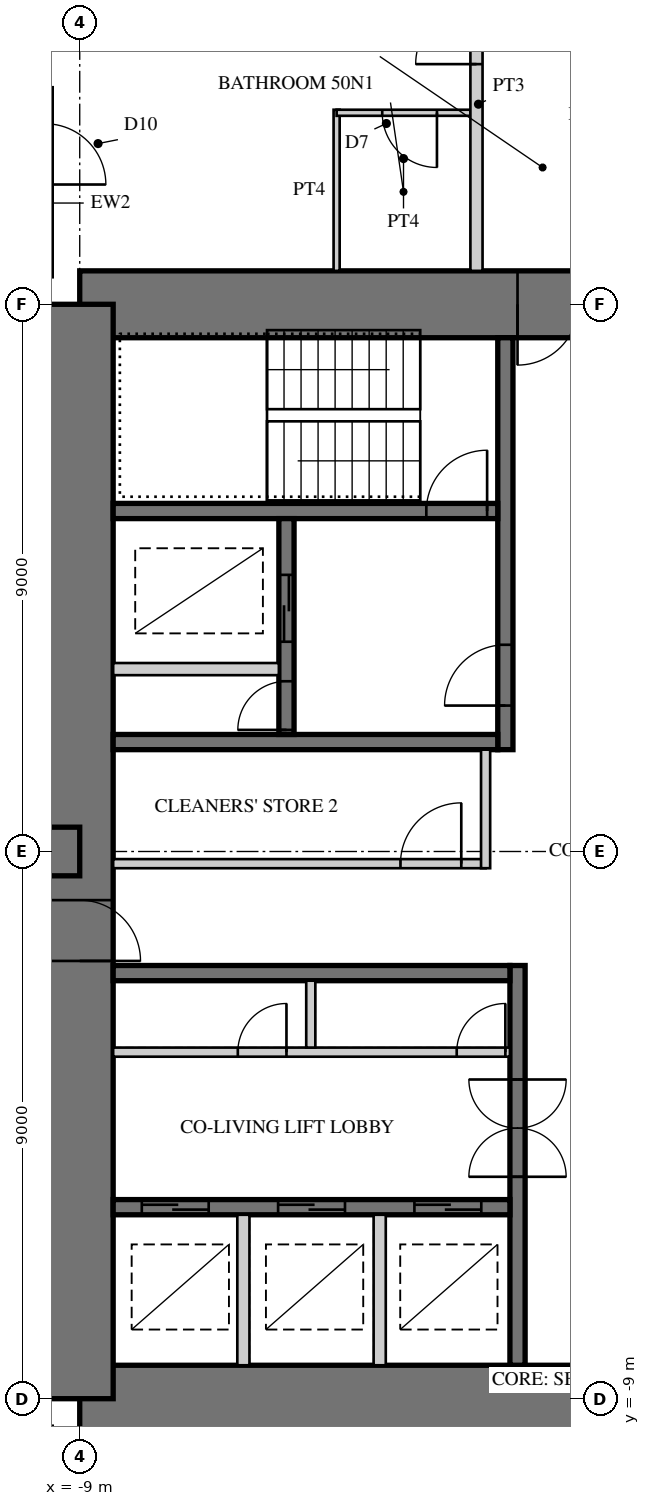
"""IFC4 building model, lengths in metres.
Left out: names, types, materials, properties, quantities, classifications, styles, units other than length and angle.
Written with IfcOpenShell. Run it as: python <this file> out.ifc"""

import sys

from ifc_helpers import new_model, si_unit, direction, frame, frame_2d, origin, place, context, subcontext, project, spatial, rectangle, extrude, element, fill, save


model = new_model("IFC4")
c1 = context("Model", 3, precision=1e-05, world=origin(), true_north=direction((0.0, 1.0)))
c2 = subcontext(c1, "Body", "Model", "MODEL_VIEW")
j1 = project(units=[si_unit("LENGTHUNIT", "METRE"), si_unit("PLANEANGLEUNIT", "RADIAN")], contexts=[c1])
p1 = place(None, origin())
s1 = spatial("IfcSite", under=j1, at=p1, CompositionType="ELEMENT")
p2 = place(p1, origin())
s2 = spatial("IfcBuilding", under=s1, at=p2, CompositionType="ELEMENT")
p3 = place(p2, frame((0.0, 0.0, 200.1)))
s3 = spatial("IfcBuildingStorey", under=s2, at=p3, CompositionType="ELEMENT", Elevation=200.1)
p4 = place(p3, frame((9.0, 9.0, 0.0), z_axis=(0.0, 0.0, 1.0), x_axis=(-1.0, 0.0, 0.0)))
e1 = element("IfcWall", 1, at=p4, inside=s3, PredefinedType="SHEAR", context=c2, shape_type="SweptSolid", body=[
    extrude(rectangle(XDim=18.0, YDim=1.1, at=frame_2d((9.0, 0.0))), origin(), (0.0, 0.0, 1.0), 3.4),
])
p5 = place(p4, frame((9.8, 0.0, 0.0)))
e2 = element("IfcOpeningElement", 2, at=p5, cuts=e1, PredefinedType="OPENING", context=c2, shape_type="SweptSolid", body=[
    extrude(rectangle(XDim=1.0, YDim=2.4, at=frame_2d((0.5, 1.2))), frame((0.0, 0.56, 0.0), z_axis=(0.0, -1.0, 0.0), x_axis=(1.0, 0.0, 0.0)), (0.0, 0.0, 1.0), 1.12),
])
p6 = place(p3, frame((-9.0, -9.0, 0.0), z_axis=(0.0, 0.0, 1.0), x_axis=(1.0, 0.0, 0.0)))
e3 = element("IfcWall", 3, at=p6, inside=s3, PredefinedType="SHEAR", context=c2, shape_type="SweptSolid", body=[
    extrude(rectangle(XDim=18.0, YDim=1.1, at=frame_2d((9.0, 0.0))), origin(), (0.0, 0.0, 1.0), 3.4),
])
p7 = place(p6, frame((9.8, 0.0, 0.0)))
e4 = element("IfcOpeningElement", 4, at=p7, cuts=e3, PredefinedType="OPENING", context=c2, shape_type="SweptSolid", body=[
    extrude(rectangle(XDim=1.0, YDim=2.4, at=frame_2d((0.5, 1.2))), frame((0.0, 0.56, 0.0), z_axis=(0.0, -1.0, 0.0), x_axis=(1.0, 0.0, 0.0)), (0.0, 0.0, 1.0), 1.12),
])
p8 = place(p3, frame((-9.0, 9.0, 0.0), z_axis=(0.0, 0.0, 1.0), x_axis=(0.0, -1.0, 0.0)))
e5 = element("IfcWall", 5, at=p8, inside=s3, PredefinedType="SHEAR", context=c2, shape_type="SweptSolid", body=[
    extrude(rectangle(XDim=18.0, YDim=1.1, at=frame_2d((9.0, 0.0))), origin(), (0.0, 0.0, 1.0), 3.4),
])
p9 = place(p8, frame((9.8, 0.0, 0.0)))
e6 = element("IfcOpeningElement", 6, at=p9, cuts=e5, PredefinedType="OPENING", context=c2, shape_type="SweptSolid", body=[
    extrude(rectangle(XDim=1.0, YDim=2.4, at=frame_2d((0.5, 1.2))), frame((0.0, 0.56, 0.0), z_axis=(0.0, -1.0, 0.0), x_axis=(1.0, 0.0, 0.0)), (0.0, 0.0, 1.0), 1.12),
])
p10 = place(p3, frame((-2.0, 1.675, 0.0), z_axis=(0.0, 0.0, 1.0), x_axis=(0.0, 1.0, 0.0)))
e7 = element("IfcWall", 7, at=p10, inside=s3, PredefinedType="SHEAR", context=c2, shape_type="SweptSolid", body=[
    extrude(rectangle(XDim=6.775, YDim=0.25, at=frame_2d((3.387, 0.0))), origin(), (0.0, 0.0, 1.0), 3.4),
])
p11 = place(p10, frame((0.725, 0.0, 0.0)))
e8 = element("IfcOpeningElement", 8, at=p11, cuts=e7, PredefinedType="OPENING", context=c2, shape_type="SweptSolid", body=[
    extrude(rectangle(XDim=1.0, YDim=2.1, at=frame_2d((0.5, 1.05))), frame((0.0, 0.135, 0.0), z_axis=(0.0, -1.0, 0.0), x_axis=(1.0, 0.0, 0.0)), (0.0, 0.0, 1.0), 0.27),
])
p12 = place(p3, frame((-2.125, 1.8, 0.0), z_axis=(0.0, 0.0, 1.0), x_axis=(-1.0, 0.0, 0.0)))
e9 = element("IfcWall", 9, at=p12, inside=s3, PredefinedType="SHEAR", context=c2, shape_type="SweptSolid", body=[
    extrude(rectangle(XDim=6.325, YDim=0.25, at=frame_2d((3.163, 0.0))), origin(), (0.0, 0.0, 1.0), 3.4),
])
p13 = place(p3, frame((-2.125, 5.6, 0.0), z_axis=(0.0, 0.0, 1.0), x_axis=(-1.0, 0.0, 0.0)))
e10 = element("IfcWall", 10, at=p13, inside=s3, PredefinedType="SHEAR", context=c2, shape_type="SweptSolid", body=[
    extrude(rectangle(XDim=6.325, YDim=0.25, at=frame_2d((3.163, 0.0))), origin(), (0.0, 0.0, 1.0), 3.4),
])
p14 = place(p13, frame((0.175, 0.0, 0.0)))
e11 = element("IfcOpeningElement", 11, at=p14, cuts=e10, PredefinedType="OPENING", context=c2, shape_type="SweptSolid", body=[
    extrude(rectangle(XDim=1.0, YDim=2.1, at=frame_2d((0.5, 1.05))), frame((0.0, 0.135, 0.0), z_axis=(0.0, -1.0, 0.0), x_axis=(1.0, 0.0, 0.0)), (0.0, 0.0, 1.0), 0.27),
])
p15 = place(p3, frame((-5.6, 1.925, 0.0), z_axis=(0.0, 0.0, 1.0), x_axis=(0.0, 1.0, 0.0)))
e12 = element("IfcWall", 12, at=p15, inside=s3, PredefinedType="SHEAR", context=c2, shape_type="SweptSolid", body=[
    extrude(rectangle(XDim=3.55, YDim=0.25, at=frame_2d((1.775, 0.0))), origin(), (0.0, 0.0, 1.0), 3.4),
])
p16 = place(p15, frame((1.525, 0.0, 0.0)))
e13 = element("IfcOpeningElement", 13, at=p16, cuts=e12, PredefinedType="OPENING", context=c2, shape_type="SweptSolid", body=[
    extrude(rectangle(XDim=1.1, YDim=2.2, at=frame_2d((0.55, 1.1))), frame((0.0, 0.135, 0.0), z_axis=(0.0, -1.0, 0.0), x_axis=(1.0, 0.0, 0.0)), (0.0, 0.0, 1.0), 0.27),
])
p17 = place(p15, frame((0.075, 0.0, 0.0)))
e14 = element("IfcOpeningElement", 14, at=p17, cuts=e12, PredefinedType="OPENING", context=c2, shape_type="SweptSolid", body=[
    extrude(rectangle(XDim=0.8, YDim=2.1, at=frame_2d((0.4, 1.05))), frame((0.0, 0.135, 0.0), z_axis=(0.0, -1.0, 0.0), x_axis=(1.0, 0.0, 0.0)), (0.0, 0.0, 1.0), 0.27),
])
p18 = place(p3, frame((-5.725, 3.0, 0.0), z_axis=(0.0, 0.0, 1.0), x_axis=(-1.0, 0.0, 0.0)))
e15 = element("IfcWall", 15, at=p18, inside=s3, PredefinedType="PARTITIONING", context=c2, shape_type="SweptSolid", body=[
    extrude(rectangle(XDim=2.725, YDim=0.2, at=frame_2d((1.362, 0.0))), origin(), (0.0, 0.0, 1.0), 3.4),
])
p19 = place(p3, frame((-1.8, -1.875, 0.0), z_axis=(0.0, 0.0, 1.0), x_axis=(0.0, -1.0, 0.0)))
e16 = element("IfcWall", 16, at=p19, inside=s3, PredefinedType="SHEAR", context=c2, shape_type="SweptSolid", body=[
    extrude(rectangle(XDim=6.575, YDim=0.25, at=frame_2d((3.288, 0.0))), origin(), (0.0, 0.0, 1.0), 3.4),
])
p20 = place(p19, frame((1.875, 0.0, 0.0)))
e17 = element("IfcOpeningElement", 17, at=p20, cuts=e16, PredefinedType="OPENING", context=c2, shape_type="SweptSolid", body=[
    extrude(rectangle(XDim=1.6, YDim=2.4, at=frame_2d((0.8, 1.2))), frame((0.0, 0.135, 0.0), z_axis=(0.0, -1.0, 0.0), x_axis=(1.0, 0.0, 0.0)), (0.0, 0.0, 1.0), 0.27),
])
p21 = place(p3, frame((-1.925, -2.0, 0.0), z_axis=(0.0, 0.0, 1.0), x_axis=(-1.0, 0.0, 0.0)))
e18 = element("IfcWall", 18, at=p21, inside=s3, PredefinedType="SHEAR", context=c2, shape_type="SweptSolid", body=[
    extrude(rectangle(XDim=6.525, YDim=0.25, at=frame_2d((3.262, 0.0))), origin(), (0.0, 0.0, 1.0), 3.4),
])
p22 = place(p3, frame((-1.925, -5.85, 0.0), z_axis=(0.0, 0.0, 1.0), x_axis=(-1.0, 0.0, 0.0)))
e19 = element("IfcWall", 19, at=p22, inside=s3, PredefinedType="SHEAR", context=c2, shape_type="SweptSolid", body=[
    extrude(rectangle(XDim=6.525, YDim=0.25, at=frame_2d((3.262, 0.0))), origin(), (0.0, 0.0, 1.0), 3.4),
])
p23 = place(p22, frame((0.471, 0.0, 0.0)))
e20 = element("IfcOpeningElement", 20, at=p23, cuts=e19, PredefinedType="OPENING", context=c2, shape_type="SweptSolid", body=[
    extrude(rectangle(XDim=1.1, YDim=2.2, at=frame_2d((0.55, 1.1))), frame((0.0, 0.135, 0.0), z_axis=(0.0, -1.0, 0.0), x_axis=(1.0, 0.0, 0.0)), (0.0, 0.0, 1.0), 0.27),
])
p24 = place(p22, frame((2.712, 0.0, 0.0)))
e21 = element("IfcOpeningElement", 21, at=p24, cuts=e19, PredefinedType="OPENING", context=c2, shape_type="SweptSolid", body=[
    extrude(rectangle(XDim=1.1, YDim=2.2, at=frame_2d((0.55, 1.1))), frame((0.0, 0.135, 0.0), z_axis=(0.0, -1.0, 0.0), x_axis=(1.0, 0.0, 0.0)), (0.0, 0.0, 1.0), 0.27),
])
p25 = place(p22, frame((4.954, 0.0, 0.0)))
e22 = element("IfcOpeningElement", 22, at=p25, cuts=e19, PredefinedType="OPENING", context=c2, shape_type="SweptSolid", body=[
    extrude(rectangle(XDim=1.1, YDim=2.2, at=frame_2d((0.55, 1.1))), frame((0.0, 0.135, 0.0), z_axis=(0.0, -1.0, 0.0), x_axis=(1.0, 0.0, 0.0)), (0.0, 0.0, 1.0), 0.27),
])
p26 = place(p3, frame((-1.925, -3.3, 0.0), z_axis=(0.0, 0.0, 1.0), x_axis=(-1.0, 0.0, 0.0)))
e23 = element("IfcWall", 23, at=p26, inside=s3, PredefinedType="PARTITIONING", context=c2, shape_type="SweptSolid", body=[
    extrude(rectangle(XDim=6.525, YDim=0.15, at=frame_2d((3.262, 0.0))), origin(), (0.0, 0.0, 1.0), 3.4),
])
p27 = place(p26, frame((0.075, 0.0, 0.0)))
e24 = element("IfcOpeningElement", 24, at=p27, cuts=e23, PredefinedType="OPENING", context=c2, shape_type="SweptSolid", body=[
    extrude(rectangle(XDim=0.8, YDim=2.1, at=frame_2d((0.4, 1.05))), frame((0.0, 0.085, 0.0), z_axis=(0.0, -1.0, 0.0), x_axis=(1.0, 0.0, 0.0)), (0.0, 0.0, 1.0), 0.17),
])
p28 = place(p26, frame((3.675, 0.0, 0.0)))
e25 = element("IfcOpeningElement", 25, at=p28, cuts=e23, PredefinedType="OPENING", context=c2, shape_type="SweptSolid", body=[
    extrude(rectangle(XDim=0.8, YDim=2.1, at=frame_2d((0.4, 1.05))), frame((0.0, 0.085, 0.0), z_axis=(0.0, -1.0, 0.0), x_axis=(1.0, 0.0, 0.0)), (0.0, 0.0, 1.0), 0.17),
])
p29 = place(p3, frame((-5.2, -2.125, 0.0), z_axis=(0.0, 0.0, 1.0), x_axis=(0.0, -1.0, 0.0)))
e26 = element("IfcWall", 26, at=p29, inside=s3, PredefinedType="PARTITIONING", context=c2, shape_type="SweptSolid", body=[
    extrude(rectangle(XDim=1.1, YDim=0.15, at=frame_2d((0.55, 0.0))), origin(), (0.0, 0.0, 1.0), 3.4),
])
for number, where, z_axis, x_axis in (
    (27, (-4.067, -5.975, 0.0), (0.0, 0.0, 1.0), (0.0, -1.0, 0.0)),
    (28, (-6.308, -5.975, 0.0), (0.0, 0.0, 1.0), (0.0, -1.0, 0.0)),
):
    element("IfcWall", number, at=place(p3, frame(where, z_axis=z_axis, x_axis=x_axis)), inside=s3, PredefinedType="PARTITIONING", context=c2, shape_type="SweptSolid", body=[
        extrude(rectangle(XDim=2.475, YDim=0.2, at=frame_2d((1.237, 0.0))), origin(), (0.0, 0.0, 1.0), 3.4),
    ])
p30 = place(p3, frame((-9.0, 0.0, 0.0), z_axis=(0.0, 0.0, 1.0), x_axis=(-1.0, 0.0, 0.0)))
e29 = element("IfcWall", 29, at=p30, inside=s3, PredefinedType="SHEAR", context=c2, shape_type="SweptSolid", body=[
    extrude(rectangle(XDim=18.0, YDim=0.8, at=frame_2d((9.0, 0.0))), origin(), (0.0, 0.0, 1.0), 3.4),
])
p31 = place(p30, frame((3.95, 0.0, 0.0)))
e30 = element("IfcOpeningElement", 30, at=p31, cuts=e29, PredefinedType="OPENING", context=c2, shape_type="SweptSolid", body=[
    extrude(rectangle(XDim=1.0, YDim=2.15, at=frame_2d((0.5, 1.075))), frame((0.0, 0.41, 0.0), z_axis=(0.0, -1.0, 0.0), x_axis=(1.0, 0.0, 0.0)), (0.0, 0.0, 1.0), 0.82),
])
p32 = place(p30, frame((6.6, 0.0, 0.0)))
e31 = element("IfcOpeningElement", 31, at=p32, cuts=e29, PredefinedType="OPENING", context=c2, shape_type="SweptSolid", body=[
    extrude(rectangle(XDim=1.0, YDim=2.15, at=frame_2d((0.5, 1.075))), frame((0.0, 0.41, 0.0), z_axis=(0.0, -1.0, 0.0), x_axis=(1.0, 0.0, 0.0)), (0.0, 0.0, 1.0), 0.82),
])
p33 = place(p30, frame((13.25, 0.0, 0.0)))
e32 = element("IfcOpeningElement", 32, at=p33, cuts=e29, PredefinedType="OPENING", context=c2, shape_type="SweptSolid", body=[
    extrude(rectangle(XDim=1.0, YDim=2.2, at=frame_2d((0.5, 1.1))), frame((0.0, 0.41, 0.0), z_axis=(0.0, -1.0, 0.0), x_axis=(1.0, 0.0, 0.0)), (0.0, 0.0, 1.0), 0.82),
])
p34 = place(p3, frame((-9.57, 12.57, 0.0), z_axis=(0.0, 0.0, 1.0), x_axis=(0.0, -1.0, 0.0)))
e33 = element("IfcWall", 33, at=p34, inside=s3, PredefinedType="SOLIDWALL", context=c2, shape_type="SweptSolid", body=[
    extrude(rectangle(XDim=2.875, YDim=0.25, at=frame_2d((1.438, 0.0))), origin(), (0.0, 0.0, 1.0), 3.22),
])
p35 = place(p34, frame((0.6, 0.0, 0.0)))
e34 = element("IfcOpeningElement", 34, at=p35, cuts=e33, PredefinedType="OPENING", context=c2, shape_type="SweptSolid", body=[
    extrude(rectangle(XDim=1.0, YDim=2.2, at=frame_2d((0.5, 1.1))), frame((0.0, 0.135, 0.0), z_axis=(0.0, -1.0, 0.0), x_axis=(1.0, 0.0, 0.0)), (0.0, 0.0, 1.0), 0.27),
])
p36 = place(p3, frame((-9.445, 9.57, 0.0), z_axis=(0.0, 0.0, 1.0), x_axis=(-1.0, 0.0, 0.0)))
e35 = element("IfcWall", 35, at=p36, inside=s3, PredefinedType="SOLIDWALL", context=c2, shape_type="SweptSolid", body=[
    extrude(rectangle(XDim=3.125, YDim=0.25, at=frame_2d((1.562, 0.0))), origin(), (0.0, 0.0, 1.0), 3.22),
])
p37 = place(p36, frame((0.6, 0.0, 0.0)))
e36 = element("IfcOpeningElement", 36, at=p37, cuts=e35, PredefinedType="OPENING", context=c2, shape_type="SweptSolid", body=[
    extrude(rectangle(XDim=1.0, YDim=2.2, at=frame_2d((0.5, 1.1))), frame((0.0, 0.135, 0.0), z_axis=(0.0, -1.0, 0.0), x_axis=(1.0, 0.0, 0.0)), (0.0, 0.0, 1.0), 0.27),
])
p38 = place(p3, frame((-9.57, -9.445, 0.0), z_axis=(0.0, 0.0, 1.0), x_axis=(0.0, -1.0, 0.0)))
e37 = element("IfcWall", 37, at=p38, inside=s3, PredefinedType="SOLIDWALL", context=c2, shape_type="SweptSolid", body=[
    extrude(rectangle(XDim=3.125, YDim=0.25, at=frame_2d((1.562, 0.0))), origin(), (0.0, 0.0, 1.0), 3.22),
])
p39 = place(p38, frame((0.6, 0.0, 0.0)))
e38 = element("IfcOpeningElement", 38, at=p39, cuts=e37, PredefinedType="OPENING", context=c2, shape_type="SweptSolid", body=[
    extrude(rectangle(XDim=1.0, YDim=2.2, at=frame_2d((0.5, 1.1))), frame((0.0, 0.135, 0.0), z_axis=(0.0, -1.0, 0.0), x_axis=(1.0, 0.0, 0.0)), (0.0, 0.0, 1.0), 0.27),
])
p40 = place(p3, frame((-2.325, -0.2, 0.0), z_axis=(0.0, 0.0, 1.0), x_axis=(-1.0, 0.0, 0.0)))
e39 = element("IfcWall", 39, at=p40, inside=s3, PredefinedType="PARTITIONING", context=c2, shape_type="SweptSolid", body=[
    extrude(rectangle(XDim=6.125, YDim=0.15, at=frame_2d((3.062, 0.0))), origin(), (0.0, 0.0, 1.0), 3.22),
])
p41 = place(p40, frame((0.4, 0.0, 0.0)))
e40 = element("IfcOpeningElement", 40, at=p41, cuts=e39, PredefinedType="OPENING", context=c2, shape_type="SweptSolid", body=[
    extrude(rectangle(XDim=1.0, YDim=2.1, at=frame_2d((0.5, 1.05))), frame((0.0, 0.085, 0.0), z_axis=(0.0, -1.0, 0.0), x_axis=(1.0, 0.0, 0.0)), (0.0, 0.0, 1.0), 0.17),
])
p42 = place(p3, frame((-2.325, 1.675, 0.0), z_axis=(0.0, 0.0, 1.0), x_axis=(0.0, -1.0, 0.0)))
e41 = element("IfcWall", 41, at=p42, inside=s3, PredefinedType="PARTITIONING", context=c2, shape_type="SweptSolid", body=[
    extrude(rectangle(XDim=1.95, YDim=0.15, at=frame_2d((0.975, 0.0))), origin(), (0.0, 0.0, 1.0), 3.22),
])
p43 = place(p3, frame((-4.775, 9.55, 0.0), z_axis=(0.0, 0.0, 1.0), x_axis=(0.0, 1.0, 0.0)))
e42 = element("IfcWall", 42, at=p43, inside=s3, PredefinedType="PARTITIONING", context=c2, shape_type="SweptSolid", body=[
    extrude(rectangle(XDim=2.65, YDim=0.1, at=frame_2d((1.325, 0.0))), origin(), (0.0, 0.0, 1.0), 3.22),
])
p44 = place(p3, frame((-2.575, 12.15, 0.0), z_axis=(0.0, 0.0, 1.0), x_axis=(-1.0, 0.0, 0.0)))
e43 = element("IfcWall", 43, at=p44, inside=s3, PredefinedType="PARTITIONING", context=c2, shape_type="SweptSolid", body=[
    extrude(rectangle(XDim=2.2, YDim=0.1, at=frame_2d((1.1, 0.0))), origin(), (0.0, 0.0, 1.0), 3.22),
])
p45 = place(p44, frame((0.55, 0.0, 0.0)))
e44 = element("IfcOpeningElement", 44, at=p45, cuts=e43, PredefinedType="OPENING", context=c2, shape_type="SweptSolid", body=[
    extrude(rectangle(XDim=0.9, YDim=2.1, at=frame_2d((0.45, 1.05))), frame((0.0, 0.06, 0.0), z_axis=(0.0, -1.0, 0.0), x_axis=(1.0, 0.0, 0.0)), (0.0, 0.0, 1.0), 0.12),
])
p46 = place(p3, frame((-2.475, 9.55, 0.0), z_axis=(0.0, 0.0, 1.0), x_axis=(0.0, 1.0, 0.0)))
e45 = element("IfcWall", 45, at=p46, inside=s3, PredefinedType="SOLIDWALL", context=c2, shape_type="SweptSolid", body=[
    extrude(rectangle(XDim=5.45, YDim=0.2, at=frame_2d((2.725, 0.0))), origin(), (0.0, 0.0, 1.0), 3.22),
])
p47 = place(p46, frame((3.4, 0.0, 0.0)))
e46 = element("IfcOpeningElement", 46, at=p47, cuts=e45, PredefinedType="OPENING", context=c2, shape_type="SweptSolid", body=[
    extrude(rectangle(XDim=1.0, YDim=2.15, at=frame_2d((0.5, 1.075))), frame((0.0, 0.11, 0.0), z_axis=(0.0, -1.0, 0.0), x_axis=(1.0, 0.0, 0.0)), (0.0, 0.0, 1.0), 0.22),
])
p48 = place(p41, frame((1.0, 0.0, 0.0), z_axis=(0.0, 0.0, 1.0), x_axis=(-1.0, 0.0, 0.0)))
e47 = element("IfcDoor", 47, at=p48, inside=s3, OperationType="SINGLE_SWING_RIGHT", PredefinedType="DOOR", context=c2, shape_type="SweptSolid", body=[
    extrude(rectangle(XDim=1.0, YDim=2.1, at=frame_2d((0.5, 1.05))), frame((0.0, 0.025, 0.0), z_axis=(0.0, -1.0, 0.0), x_axis=(1.0, 0.0, 0.0)), (0.0, 0.0, 1.0), 0.05),
])
fill(e40, e47)
p49 = place(p45, origin())
e48 = element("IfcDoor", 48, at=p49, inside=s3, OperationType="SINGLE_SWING_LEFT", PredefinedType="DOOR", context=c2, shape_type="SweptSolid", body=[
    extrude(rectangle(XDim=0.9, YDim=2.1, at=frame_2d((0.45, 1.05))), frame((0.0, 0.025, 0.0), z_axis=(0.0, -1.0, 0.0), x_axis=(1.0, 0.0, 0.0)), (0.0, 0.0, 1.0), 0.05),
])
fill(e44, e48)
p50 = place(p47, origin())
e49 = element("IfcDoor", 49, at=p50, inside=s3, OperationType="SINGLE_SWING_LEFT", PredefinedType="DOOR", context=c2, shape_type="SweptSolid", body=[
    extrude(rectangle(XDim=1.0, YDim=2.15, at=frame_2d((0.5, 1.075))), frame((0.0, 0.025, 0.0), z_axis=(0.0, -1.0, 0.0), x_axis=(1.0, 0.0, 0.0)), (0.0, 0.0, 1.0), 0.05),
])
fill(e46, e49)
p51 = place(p5, origin())
e50 = element("IfcDoor", 50, at=p51, inside=s3, OperationType="SINGLE_SWING_RIGHT", PredefinedType="DOOR", context=c2, shape_type="SweptSolid", body=[
    extrude(rectangle(XDim=1.0, YDim=2.4, at=frame_2d((0.5, 1.2))), frame((0.0, 0.055, 0.0), z_axis=(0.0, -1.0, 0.0), x_axis=(1.0, 0.0, 0.0)), (0.0, 0.0, 1.0), 0.05),
])
fill(e2, e50)
p52 = place(p9, origin())
e51 = element("IfcDoor", 51, at=p52, inside=s3, OperationType="SINGLE_SWING_RIGHT", PredefinedType="DOOR", context=c2, shape_type="SweptSolid", body=[
    extrude(rectangle(XDim=1.0, YDim=2.4, at=frame_2d((0.5, 1.2))), frame((0.0, 0.055, 0.0), z_axis=(0.0, -1.0, 0.0), x_axis=(1.0, 0.0, 0.0)), (0.0, 0.0, 1.0), 0.05),
])
fill(e6, e51)
p53 = place(p11, origin())
e52 = element("IfcDoor", 52, at=p53, inside=s3, OperationType="SINGLE_SWING_LEFT", PredefinedType="DOOR", context=c2, shape_type="SweptSolid", body=[
    extrude(rectangle(XDim=1.0, YDim=2.1, at=frame_2d((0.5, 1.05))), frame((0.0, 0.025, 0.0), z_axis=(0.0, -1.0, 0.0), x_axis=(1.0, 0.0, 0.0)), (0.0, 0.0, 1.0), 0.05),
])
fill(e8, e52)
p54 = place(p14, frame((1.0, 0.0, 0.0), z_axis=(0.0, 0.0, 1.0), x_axis=(-1.0, 0.0, 0.0)))
e53 = element("IfcDoor", 53, at=p54, inside=s3, OperationType="SINGLE_SWING_RIGHT", PredefinedType="DOOR", context=c2, shape_type="SweptSolid", body=[
    extrude(rectangle(XDim=1.0, YDim=2.1, at=frame_2d((0.5, 1.05))), frame((0.0, 0.025, 0.0), z_axis=(0.0, -1.0, 0.0), x_axis=(1.0, 0.0, 0.0)), (0.0, 0.0, 1.0), 0.05),
])
fill(e11, e53)
p55 = place(p16, origin())
e54 = element("IfcDoor", 54, at=p55, inside=s3, OperationType="DOUBLE_DOOR_SLIDING", PredefinedType="DOOR", context=c2, shape_type="SweptSolid", body=[
    extrude(rectangle(XDim=1.1, YDim=2.2, at=frame_2d((0.55, 1.1))), frame((0.0, 0.025, 0.0), z_axis=(0.0, -1.0, 0.0), x_axis=(1.0, 0.0, 0.0)), (0.0, 0.0, 1.0), 0.05),
])
fill(e13, e54)
p56 = place(p17, origin())
e55 = element("IfcDoor", 55, at=p56, inside=s3, OperationType="SINGLE_SWING_LEFT", PredefinedType="DOOR", context=c2, shape_type="SweptSolid", body=[
    extrude(rectangle(XDim=0.8, YDim=2.1, at=frame_2d((0.4, 1.05))), frame((0.0, 0.025, 0.0), z_axis=(0.0, -1.0, 0.0), x_axis=(1.0, 0.0, 0.0)), (0.0, 0.0, 1.0), 0.05),
])
fill(e14, e55)
p57 = place(p23, origin())
e56 = element("IfcDoor", 56, at=p57, inside=s3, OperationType="DOUBLE_DOOR_SLIDING", PredefinedType="DOOR", context=c2, shape_type="SweptSolid", body=[
    extrude(rectangle(XDim=1.1, YDim=2.2, at=frame_2d((0.55, 1.1))), frame((0.0, 0.025, 0.0), z_axis=(0.0, -1.0, 0.0), x_axis=(1.0, 0.0, 0.0)), (0.0, 0.0, 1.0), 0.05),
])
fill(e20, e56)
p58 = place(p24, origin())
e57 = element("IfcDoor", 57, at=p58, inside=s3, OperationType="DOUBLE_DOOR_SLIDING", PredefinedType="DOOR", context=c2, shape_type="SweptSolid", body=[
    extrude(rectangle(XDim=1.1, YDim=2.2, at=frame_2d((0.55, 1.1))), frame((0.0, 0.025, 0.0), z_axis=(0.0, -1.0, 0.0), x_axis=(1.0, 0.0, 0.0)), (0.0, 0.0, 1.0), 0.05),
])
fill(e21, e57)
p59 = place(p25, origin())
e58 = element("IfcDoor", 58, at=p59, inside=s3, OperationType="DOUBLE_DOOR_SLIDING", PredefinedType="DOOR", context=c2, shape_type="SweptSolid", body=[
    extrude(rectangle(XDim=1.1, YDim=2.2, at=frame_2d((0.55, 1.1))), frame((0.0, 0.025, 0.0), z_axis=(0.0, -1.0, 0.0), x_axis=(1.0, 0.0, 0.0)), (0.0, 0.0, 1.0), 0.05),
])
fill(e22, e58)
p60 = place(p20, origin())
e59 = element("IfcDoor", 59, at=p60, inside=s3, OperationType="DOUBLE_DOOR_DOUBLE_SWING", PredefinedType="DOOR", context=c2, shape_type="SweptSolid", body=[
    extrude(rectangle(XDim=1.6, YDim=2.4, at=frame_2d((0.8, 1.2))), frame((0.0, 0.025, 0.0), z_axis=(0.0, -1.0, 0.0), x_axis=(1.0, 0.0, 0.0)), (0.0, 0.0, 1.0), 0.05),
])
fill(e17, e59)
p61 = place(p27, frame((0.8, 0.0, 0.0), z_axis=(0.0, 0.0, 1.0), x_axis=(-1.0, 0.0, 0.0)))
e60 = element("IfcDoor", 60, at=p61, inside=s3, OperationType="SINGLE_SWING_RIGHT", PredefinedType="DOOR", context=c2, shape_type="SweptSolid", body=[
    extrude(rectangle(XDim=0.8, YDim=2.1, at=frame_2d((0.4, 1.05))), frame((0.0, 0.025, 0.0), z_axis=(0.0, -1.0, 0.0), x_axis=(1.0, 0.0, 0.0)), (0.0, 0.0, 1.0), 0.05),
])
fill(e24, e60)
p62 = place(p28, frame((0.8, 0.0, 0.0), z_axis=(0.0, 0.0, 1.0), x_axis=(-1.0, 0.0, 0.0)))
e61 = element("IfcDoor", 61, at=p62, inside=s3, OperationType="SINGLE_SWING_RIGHT", PredefinedType="DOOR", context=c2, shape_type="SweptSolid", body=[
    extrude(rectangle(XDim=0.8, YDim=2.1, at=frame_2d((0.4, 1.05))), frame((0.0, 0.025, 0.0), z_axis=(0.0, -1.0, 0.0), x_axis=(1.0, 0.0, 0.0)), (0.0, 0.0, 1.0), 0.05),
])
fill(e25, e61)
save(model, sys.argv[1])
